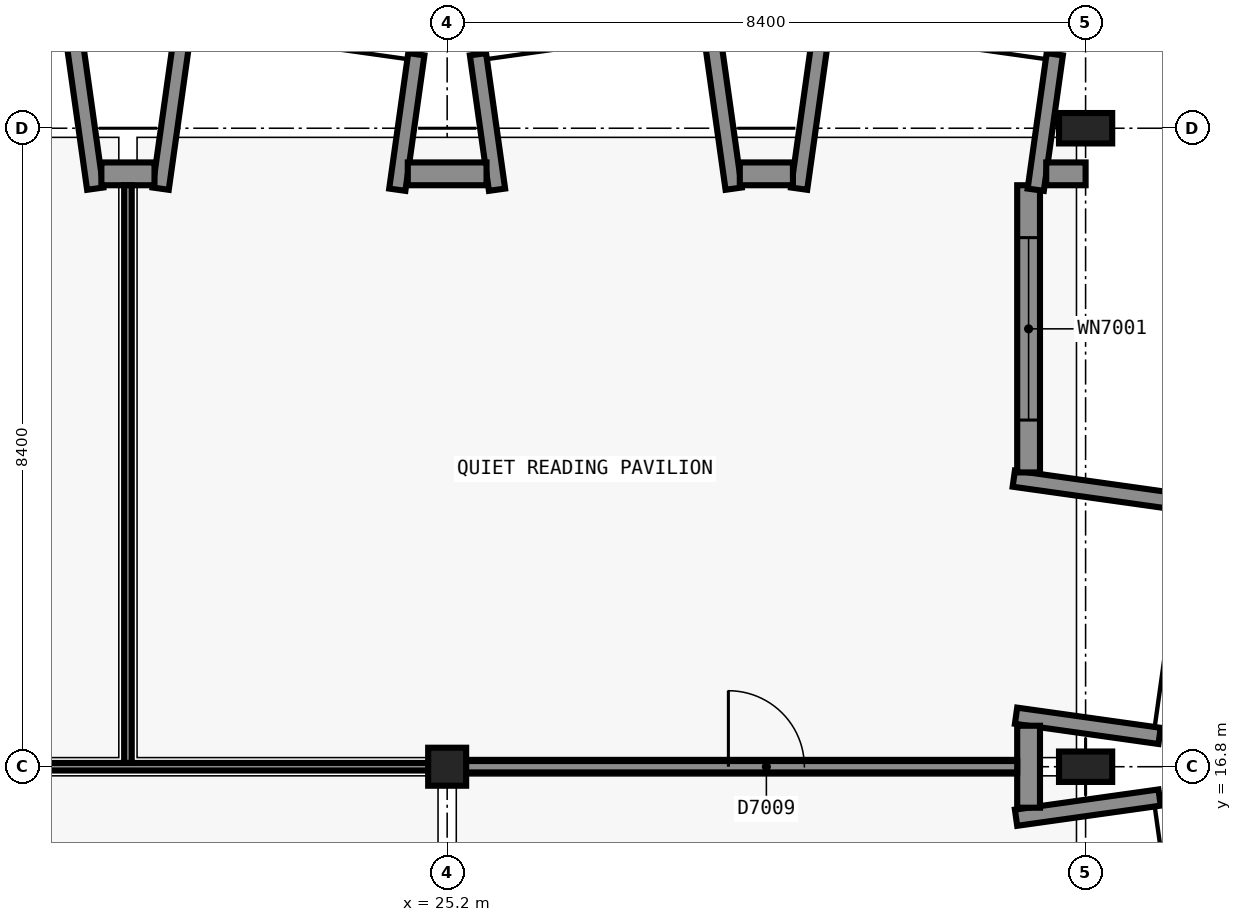
"""IFC4 building model, lengths in metres.
Left out: names, types, materials, properties, quantities, classifications, styles, units other than length and angle.
Written with IfcOpenShell. Run it as: python <this file> out.ifc"""

import sys

from ifc_helpers import new_model, si_unit, direction, frame, frame_2d, origin, origin_2d, place, context, subcontext, project, spatial, rectangle, extrude, element, fill, save


model = new_model("IFC4")
c1 = context("Model", 3, precision=1e-05, world=origin(), true_north=direction((0.0, 1.0)))
c2 = subcontext(c1, "Body", "Model", "MODEL_VIEW")
j1 = project(units=[si_unit("LENGTHUNIT", "METRE"), si_unit("PLANEANGLEUNIT", "RADIAN")], contexts=[c1])
p1 = place(None, origin())
s1 = spatial("IfcSite", under=j1, at=p1, CompositionType="ELEMENT")
p2 = place(p1, origin())
s2 = spatial("IfcBuilding", under=s1, at=p2, CompositionType="ELEMENT")
p3 = place(p2, frame((0.0, 0.0, 33.6)))
s3 = spatial("IfcBuildingStorey", under=s2, at=p3, CompositionType="ELEMENT", Elevation=33.6)
p4 = place(p3, frame((25.2, 16.8, 0.0), z_axis=(0.0, 0.0, 1.0), x_axis=(1.0, 0.0, 0.0)))
e1 = element("IfcColumn", 1, at=p4, inside=s3, PredefinedType="COLUMN", context=c2, shape_type="SweptSolid", body=[
    extrude(rectangle(XDim=0.5, YDim=0.5, at=origin_2d()), origin(), (0.0, 0.0, 1.0), 4.5),
])
for number, where, z_axis, x_axis in (
    (2, (33.6, 16.8, 0.0), (0.0, 0.0, 1.0), (0.0, 1.0, 0.0)),
    (3, (33.6, 25.2, 0.0), (0.0, 0.0, 1.0), (1.0, 0.0, 0.0)),
):
    element("IfcColumn", number, at=place(p3, frame(where, z_axis=z_axis, x_axis=x_axis)), inside=s3, PredefinedType="COLUMN", context=c2, shape_type="SweptSolid", body=[
        extrude(rectangle(XDim=0.7, YDim=0.4, at=origin_2d()), origin(), (0.0, 0.0, 1.0), 4.5),
    ])
for number, where, z_axis, x_axis in (
    (4, (32.685, 16.129, 0.0), (0.0, 0.0, 1.0), (0.99, 0.139, 0.0)),
    (5, (32.685, 17.471, 0.0), (0.0, 0.0, 1.0), (0.99, -0.139, 0.0)),
):
    element("IfcWall", number, at=place(p3, frame(where, z_axis=z_axis, x_axis=x_axis)), inside=s3, PredefinedType="SOLIDWALL", context=c2, shape_type="SweptSolid", body=[
        extrude(rectangle(XDim=1.907, YDim=0.215, at=frame_2d((0.954, 0.0))), origin(), (0.0, 0.0, 1.0), 4.2),
    ])
p5 = place(p3, frame((32.655, 20.591, 0.0), z_axis=(0.0, 0.0, 1.0), x_axis=(0.990262124675, -0.139215388641, 0.0)))
e6 = element("IfcWall", 6, at=p5, inside=s3, PredefinedType="SOLIDWALL", context=c2, shape_type="SweptSolid", body=[
    extrude(rectangle(XDim=2.371, YDim=0.215, at=frame_2d((1.186, 0.0))), origin(), (0.0, 0.0, 1.0), 4.2),
])
p6 = place(p3, frame((32.85, 17.339, 0.0), z_axis=(0.0, 0.0, 1.0), x_axis=(0.0, -1.0, 0.0)))
e7 = element("IfcWall", 7, at=p6, inside=s3, PredefinedType="SOLIDWALL", context=c2, shape_type="SweptSolid", body=[
    extrude(rectangle(XDim=1.078, YDim=0.3, at=frame_2d((0.539, 0.0))), origin(), (0.0, 0.0, 1.0), 4.2),
])
p7 = place(p3, frame((32.85, 24.45, 0.0), z_axis=(0.0, 0.0, 1.0), x_axis=(0.0, -1.0, 0.0)))
e8 = element("IfcWall", 8, at=p7, inside=s3, PredefinedType="SOLIDWALL", context=c2, shape_type="SweptSolid", body=[
    extrude(rectangle(XDim=3.778, YDim=0.3, at=frame_2d((1.889, 0.0))), origin(), (0.0, 0.0, 1.0), 4.2),
])
p8 = place(p7, frame((0.689, 0.0, 0.9)))
e9 = element("IfcOpeningElement", 9, at=p8, cuts=e8, PredefinedType="OPENING", context=c2, shape_type="SweptSolid", body=[
    extrude(rectangle(XDim=2.4, YDim=1.5, at=frame_2d((1.2, 0.75))), frame((0.0, 0.16, 0.0), z_axis=(0.0, -1.0, 0.0), x_axis=(1.0, 0.0, 0.0)), (0.0, 0.0, 1.0), 0.32),
])
for number, where, z_axis, x_axis in (
    (10, (20.569, 24.405, 0.0), (0.0, 0.0, 1.0), (-0.139, 0.99, 0.0)),
    (11, (21.431, 24.405, 0.0), (0.0, 0.0, 1.0), (0.139, 0.99, 0.0)),
):
    element("IfcWall", number, at=place(p3, frame(where, z_axis=z_axis, x_axis=x_axis)), inside=s3, PredefinedType="SOLIDWALL", context=c2, shape_type="SweptSolid", body=[
        extrude(rectangle(XDim=2.219, YDim=0.215, at=frame_2d((1.11, 0.0))), origin(), (0.0, 0.0, 1.0), 4.2),
    ])
for number, where, z_axis, x_axis in (
    (12, (24.544, 24.391, 0.0), (0.0, 0.0, 1.0), (0.139, 0.99, 0.0)),
    (13, (25.856, 24.391, 0.0), (0.0, 0.0, 1.0), (-0.139, 0.99, 0.0)),
):
    element("IfcWall", number, at=place(p3, frame(where, z_axis=z_axis, x_axis=x_axis)), inside=s3, PredefinedType="SOLIDWALL", context=c2, shape_type="SweptSolid", body=[
        extrude(rectangle(XDim=1.8, YDim=0.215, at=frame_2d((0.9, 0.0))), origin(), (0.0, 0.0, 1.0), 4.2),
    ])
p9 = place(p3, frame((28.969, 24.405, 0.0), z_axis=(0.0, 0.0, 1.0), x_axis=(-0.139249775508, 0.99025728981, 0.0)))
e14 = element("IfcWall", 14, at=p9, inside=s3, PredefinedType="SOLIDWALL", context=c2, shape_type="SweptSolid", body=[
    extrude(rectangle(XDim=2.22, YDim=0.215, at=frame_2d((1.11, 0.0))), origin(), (0.0, 0.0, 1.0), 4.2),
])
p10 = place(p3, frame((29.831, 24.405, 0.0), z_axis=(0.0, 0.0, 1.0), x_axis=(0.139141913905, 0.990272451295, 0.0)))
e15 = element("IfcWall", 15, at=p10, inside=s3, PredefinedType="SOLIDWALL", context=c2, shape_type="SweptSolid", body=[
    extrude(rectangle(XDim=2.219, YDim=0.215, at=frame_2d((1.11, 0.0))), origin(), (0.0, 0.0, 1.0), 4.2),
])
p11 = place(p3, frame((32.944, 24.391, 0.0), z_axis=(0.0, 0.0, 1.0), x_axis=(0.139161311926, 0.990269725511, 0.0)))
e16 = element("IfcWall", 16, at=p11, inside=s3, PredefinedType="SOLIDWALL", context=c2, shape_type="SweptSolid", body=[
    extrude(rectangle(XDim=1.8, YDim=0.215, at=frame_2d((0.9, 0.0))), origin(), (0.0, 0.0, 1.0), 4.2),
])
p12 = place(p3, frame((20.65, 24.6, 0.0), z_axis=(0.0, 0.0, 1.0), x_axis=(1.0, 0.0, 0.0)))
e17 = element("IfcWall", 17, at=p12, inside=s3, PredefinedType="SOLIDWALL", context=c2, shape_type="SweptSolid", body=[
    extrude(rectangle(XDim=0.699, YDim=0.3, at=frame_2d((0.35, 0.0))), origin(), (0.0, 0.0, 1.0), 4.2),
])
p13 = place(p3, frame((24.682, 24.6, 0.0), z_axis=(0.0, 0.0, 1.0), x_axis=(1.0, 0.0, 0.0)))
e18 = element("IfcWall", 18, at=p13, inside=s3, PredefinedType="SOLIDWALL", context=c2, shape_type="SweptSolid", body=[
    extrude(rectangle(XDim=1.036, YDim=0.3, at=frame_2d((0.518, 0.0))), origin(), (0.0, 0.0, 1.0), 4.2),
])
p14 = place(p3, frame((29.051, 24.6, 0.0), z_axis=(0.0, 0.0, 1.0), x_axis=(1.0, 0.0, 0.0)))
e19 = element("IfcWall", 19, at=p14, inside=s3, PredefinedType="SOLIDWALL", context=c2, shape_type="SweptSolid", body=[
    extrude(rectangle(XDim=0.699, YDim=0.3, at=frame_2d((0.35, 0.0))), origin(), (0.0, 0.0, 1.0), 4.2),
])
p15 = place(p3, frame((33.082, 24.6, 0.0), z_axis=(0.0, 0.0, 1.0), x_axis=(1.0, 0.0, 0.0)))
e20 = element("IfcWall", 20, at=p15, inside=s3, PredefinedType="SOLIDWALL", context=c2, shape_type="SweptSolid", body=[
    extrude(rectangle(XDim=0.518, YDim=0.3, at=frame_2d((0.259, 0.0))), origin(), (0.0, 0.0, 1.0), 4.2),
])
p16 = place(p3, frame((25.125, 16.8, 0.0), z_axis=(0.0, 0.0, 1.0), x_axis=(1.0, 0.0, 0.0)))
e21 = element("IfcWall", 21, at=p16, inside=s3, PredefinedType="PARTITIONING", context=c2, shape_type="SweptSolid", body=[
    extrude(rectangle(XDim=7.575, YDim=0.15, at=frame_2d((3.788, 0.0))), origin(), (0.0, 0.0, 1.0), 3.5),
])
p17 = place(p16, frame((3.775, 0.0, 0.0)))
e22 = element("IfcOpeningElement", 22, at=p17, cuts=e21, PredefinedType="OPENING", context=c2, shape_type="SweptSolid", body=[
    extrude(rectangle(XDim=1.0, YDim=2.1, at=frame_2d((0.5, 1.05))), frame((0.0, 0.085, 0.0), z_axis=(0.0, -1.0, 0.0), x_axis=(1.0, 0.0, 0.0)), (0.0, 0.0, 1.0), 0.17),
])
p18 = place(p3, frame((8.475, 16.8, 0.0), z_axis=(0.0, 0.0, 1.0), x_axis=(1.0, 0.0, 0.0)))
e23 = element("IfcWall", 23, at=p18, inside=s3, PredefinedType="PARTITIONING", context=c2, shape_type="SweptSolid", body=[
    extrude(rectangle(XDim=16.65, YDim=0.1, at=frame_2d((8.325, 0.0))), origin(), (0.0, 0.0, 1.0), 3.5),
])
p19 = place(p18, frame((5.725, 0.0, 0.0)))
e24 = element("IfcOpeningElement", 24, at=p19, cuts=e23, PredefinedType="OPENING", context=c2, shape_type="SweptSolid", body=[
    extrude(rectangle(XDim=1.0, YDim=2.1, at=frame_2d((0.5, 1.05))), frame((0.0, 0.06, 0.0), z_axis=(0.0, -1.0, 0.0), x_axis=(1.0, 0.0, 0.0)), (0.0, 0.0, 1.0), 0.12),
])
p20 = place(p3, frame((21.0, 16.85, 0.0), z_axis=(0.0, 0.0, 1.0), x_axis=(0.0, 1.0, 0.0)))
e25 = element("IfcWall", 25, at=p20, inside=s3, PredefinedType="PARTITIONING", context=c2, shape_type="SweptSolid", body=[
    extrude(rectangle(XDim=7.6, YDim=0.1, at=frame_2d((3.8, 0.0))), origin(), (0.0, 0.0, 1.0), 3.5),
])
p21 = place(p8, origin())
e26 = element("IfcWindow", 26, at=p21, inside=s3, PartitioningType="SINGLE_PANEL", PredefinedType="WINDOW", context=c2, shape_type="SweptSolid", body=[
    extrude(rectangle(XDim=2.4, YDim=1.5, at=frame_2d((1.2, 0.75))), frame((0.0, 0.03, 0.0), z_axis=(0.0, -1.0, 0.0), x_axis=(1.0, 0.0, 0.0)), (0.0, 0.0, 1.0), 0.06),
])
fill(e9, e26)
p22 = place(p17, origin())
e27 = element("IfcDoor", 27, at=p22, inside=s3, OperationType="SINGLE_SWING_LEFT", PredefinedType="DOOR", context=c2, shape_type="SweptSolid", body=[
    extrude(rectangle(XDim=1.0, YDim=2.1, at=frame_2d((0.5, 1.05))), frame((0.0, 0.025, 0.0), z_axis=(0.0, -1.0, 0.0), x_axis=(1.0, 0.0, 0.0)), (0.0, 0.0, 1.0), 0.05),
])
fill(e22, e27)
save(model, sys.argv[1])
